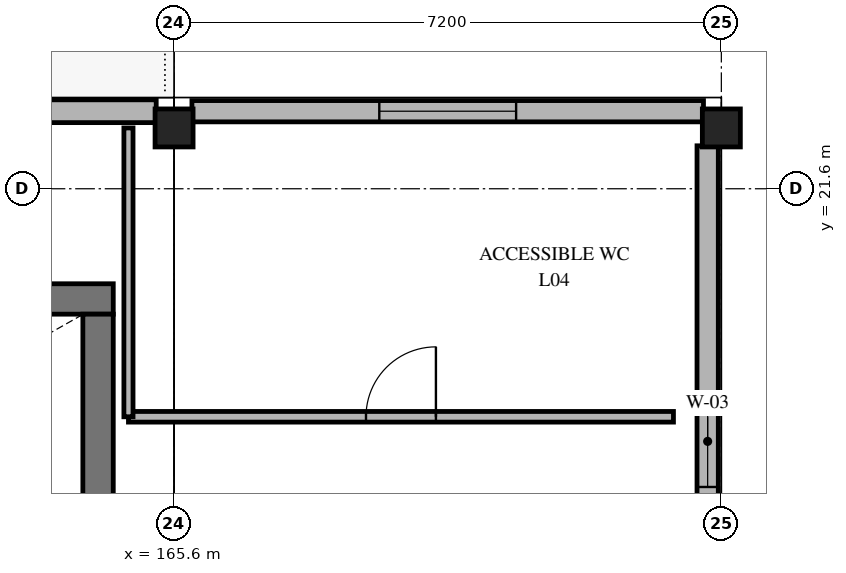
"""IFC4 building model, lengths in metres.
Left out: names, types, materials, properties, quantities, classifications, styles, units other than length and angle.
Written with IfcOpenShell. Run it as: python <this file> out.ifc"""

import sys

from ifc_helpers import new_model, si_unit, direction, frame, frame_2d, origin, origin_2d, place, context, subcontext, project, spatial, rectangle, extrude, element, fill, save


model = new_model("IFC4")
c1 = context("Model", 3, precision=1e-05, world=origin(), true_north=direction((0.0, 1.0)))
c2 = subcontext(c1, "Body", "Model", "MODEL_VIEW")
j1 = project(units=[si_unit("LENGTHUNIT", "METRE"), si_unit("PLANEANGLEUNIT", "RADIAN")], contexts=[c1])
p1 = place(None, origin())
s1 = spatial("IfcSite", under=j1, at=p1, CompositionType="ELEMENT")
p2 = place(p1, origin())
s2 = spatial("IfcBuilding", under=s1, at=p2, CompositionType="ELEMENT")
p3 = place(p2, frame((0.0, 0.0, 16.8)))
s3 = spatial("IfcBuildingStorey", under=s2, at=p3, CompositionType="ELEMENT", Elevation=16.8)
for number, where, z_axis, x_axis in (
    (1, (165.6, 22.4, 0.0), (0.0, 0.0, 1.0), (1.0, 0.0, 0.0)),
    (2, (172.8, 22.4, 0.0), (0.0, 0.0, 1.0), (1.0, 0.0, 0.0)),
):
    element("IfcColumn", number, at=place(p3, frame(where, z_axis=z_axis, x_axis=x_axis)), inside=s3, PredefinedType="COLUMN", context=c2, shape_type="SweptSolid", body=[
        extrude(rectangle(XDim=0.5, YDim=0.5, at=origin_2d()), origin(), (0.0, 0.0, 1.0), 3.9),
    ])
p4 = place(p3, frame((172.62, 22.165, 0.0), z_axis=(0.0, 0.0, 1.0), x_axis=(0.0, -1.0, 0.0)))
e3 = element("IfcWall", 3, at=p4, inside=s3, PredefinedType="SOLIDWALL", context=c2, shape_type="SweptSolid", body=[
    extrude(rectangle(XDim=7.777, YDim=0.28, at=frame_2d((3.889, 0.0))), origin(), (0.0, 0.0, 1.0), 2.93),
])
p5 = place(p4, frame((3.289, 0.0, 0.9)))
e4 = element("IfcOpeningElement", 4, at=p5, cuts=e3, PredefinedType="OPENING", context=c2, shape_type="SweptSolid", body=[
    extrude(rectangle(XDim=1.2, YDim=1.2, at=frame_2d((0.6, 0.6))), frame((0.0, 0.15, 0.0), z_axis=(0.0, -1.0, 0.0), x_axis=(1.0, 0.0, 0.0)), (0.0, 0.0, 1.0), 0.3),
])
p6 = place(p3, frame((158.635, 22.62, 0.0), z_axis=(0.0, 0.0, 1.0), x_axis=(1.0, 0.0, 0.0)))
e5 = element("IfcWall", 5, at=p6, inside=s3, PredefinedType="SOLIDWALL", context=c2, shape_type="SweptSolid", body=[
    extrude(rectangle(XDim=6.73, YDim=0.3, at=frame_2d((3.365, 0.0))), origin(), (0.0, 0.0, 1.0), 2.98),
])
p7 = place(p6, frame((2.615, 0.0, 0.9)))
e6 = element("IfcOpeningElement", 6, at=p7, cuts=e5, PredefinedType="OPENING", context=c2, shape_type="SweptSolid", body=[
    extrude(rectangle(XDim=1.5, YDim=1.35, at=frame_2d((0.75, 0.675))), frame((0.0, 0.16, 0.0), z_axis=(0.0, -1.0, 0.0), x_axis=(1.0, 0.0, 0.0)), (0.0, 0.0, 1.0), 0.32),
])
p8 = place(p3, frame((165.835, 22.62, 0.0), z_axis=(0.0, 0.0, 1.0), x_axis=(1.0, 0.0, 0.0)))
e7 = element("IfcWall", 7, at=p8, inside=s3, PredefinedType="SOLIDWALL", context=c2, shape_type="SweptSolid", body=[
    extrude(rectangle(XDim=6.73, YDim=0.28, at=frame_2d((3.365, 0.0))), origin(), (0.0, 0.0, 1.0), 3.03),
])
p9 = place(p8, frame((2.465, 0.0, 0.9)))
e8 = element("IfcOpeningElement", 8, at=p9, cuts=e7, PredefinedType="OPENING", context=c2, shape_type="SweptSolid", body=[
    extrude(rectangle(XDim=1.8, YDim=1.35, at=frame_2d((0.9, 0.675))), frame((0.0, 0.15, 0.0), z_axis=(0.0, -1.0, 0.0), x_axis=(1.0, 0.0, 0.0)), (0.0, 0.0, 1.0), 0.3),
])
p10 = place(p3, frame((164.8, 20.15, 0.0), z_axis=(0.0, 0.0, 1.0), x_axis=(-1.0, 0.0, 0.0)))
e9 = element("IfcWall", 9, at=p10, inside=s3, PredefinedType="SHEAR", context=c2, shape_type="SweptSolid", body=[
    extrude(rectangle(XDim=9.2, YDim=0.4, at=frame_2d((4.6, 0.0))), origin(), (0.0, 0.0, 1.0), 3.68),
])
p11 = place(p3, frame((164.6, 16.2, 0.0), z_axis=(0.0, 0.0, 1.0), x_axis=(0.0, 1.0, 0.0)))
e10 = element("IfcWall", 10, at=p11, inside=s3, PredefinedType="SHEAR", context=c2, shape_type="SweptSolid", body=[
    extrude(rectangle(XDim=3.75, YDim=0.4, at=frame_2d((1.875, 0.0))), origin(), (0.0, 0.0, 1.0), 3.68),
])
p12 = place(p3, frame((165.0, 18.6, 0.0), z_axis=(0.0, 0.0, 1.0), x_axis=(1.0, 0.0, 0.0)))
e11 = element("IfcWall", 11, at=p12, inside=s3, PredefinedType="PARTITIONING", context=c2, shape_type="SweptSolid", body=[
    extrude(rectangle(XDim=7.17, YDim=0.14, at=frame_2d((3.585, 0.0))), origin(), (0.0, 0.0, 1.0), 2.88),
])
p13 = place(p12, frame((3.125, 0.0, 0.0)))
e12 = element("IfcOpeningElement", 12, at=p13, cuts=e11, PredefinedType="OPENING", context=c2, shape_type="SweptSolid", body=[
    extrude(rectangle(XDim=0.92, YDim=2.1, at=frame_2d((0.46, 1.05))), frame((0.0, 0.08, 0.0), z_axis=(0.0, -1.0, 0.0), x_axis=(1.0, 0.0, 0.0)), (0.0, 0.0, 1.0), 0.16),
])
p14 = place(p3, frame((165.0, 22.4, 0.0), z_axis=(0.0, 0.0, 1.0), x_axis=(0.0, -1.0, 0.0)))
e13 = element("IfcWall", 13, at=p14, inside=s3, PredefinedType="PARTITIONING", context=c2, shape_type="SweptSolid", body=[
    extrude(rectangle(XDim=3.8, YDim=0.12, at=frame_2d((1.9, 0.0))), origin(), (0.0, 0.0, 1.0), 2.98),
])
p15 = place(p5, origin())
e14 = element("IfcWindow", 14, at=p15, inside=s3, PartitioningType="SINGLE_PANEL", PredefinedType="WINDOW", context=c2, shape_type="SweptSolid", body=[
    extrude(rectangle(XDim=1.2, YDim=1.2, at=frame_2d((0.6, 0.6))), frame((0.0, 0.03, 0.0), z_axis=(0.0, -1.0, 0.0), x_axis=(1.0, 0.0, 0.0)), (0.0, 0.0, 1.0), 0.06),
])
fill(e4, e14)
p16 = place(p9, origin())
e15 = element("IfcWindow", 15, at=p16, inside=s3, PartitioningType="SINGLE_PANEL", PredefinedType="WINDOW", context=c2, shape_type="SweptSolid", body=[
    extrude(rectangle(XDim=1.8, YDim=1.35, at=frame_2d((0.9, 0.675))), frame((0.0, 0.03, 0.0), z_axis=(0.0, -1.0, 0.0), x_axis=(1.0, 0.0, 0.0)), (0.0, 0.0, 1.0), 0.06),
])
fill(e8, e15)
p17 = place(p13, origin())
e16 = element("IfcDoor", 16, at=p17, inside=s3, OperationType="SINGLE_SWING_RIGHT", PredefinedType="DOOR", context=c2, shape_type="SweptSolid", body=[
    extrude(rectangle(XDim=0.92, YDim=2.1, at=frame_2d((0.46, 1.05))), frame((0.0, 0.025, 0.0), z_axis=(0.0, -1.0, 0.0), x_axis=(1.0, 0.0, 0.0)), (0.0, 0.0, 1.0), 0.05),
])
fill(e12, e16)
save(model, sys.argv[1])
